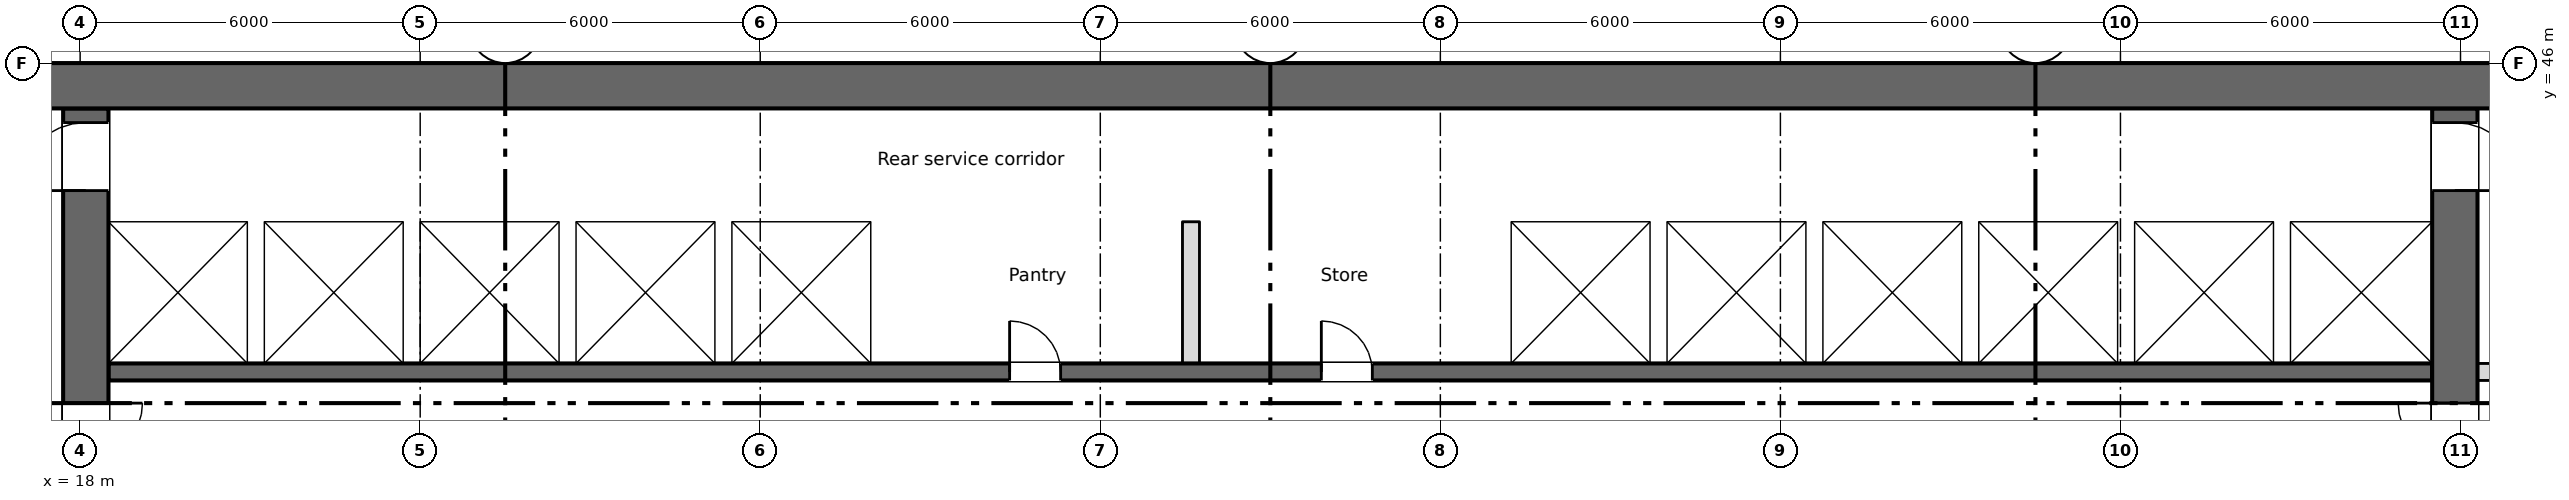
"""IFC4 building model, lengths in metres.
Left out: names, types, materials, properties, quantities, classifications, styles, units other than length and angle.
Written with IfcOpenShell. Run it as: python <this file> out.ifc"""

import sys

from ifc_helpers import new_model, si_unit, direction, frame, frame_2d, origin, place, context, subcontext, project, spatial, rectangle, extrude, element, fill, save


model = new_model("IFC4")
c1 = context("Model", 3, precision=1e-05, world=origin(), true_north=direction((0.0, 1.0)))
c2 = subcontext(c1, "Body", "Model", "MODEL_VIEW")
j1 = project(units=[si_unit("LENGTHUNIT", "METRE"), si_unit("PLANEANGLEUNIT", "RADIAN")], contexts=[c1])
p1 = place(None, origin())
s1 = spatial("IfcSite", under=j1, at=p1, CompositionType="ELEMENT")
p2 = place(p1, origin())
s2 = spatial("IfcBuilding", under=s1, at=p2, CompositionType="ELEMENT")
p3 = place(p2, frame((0.0, 0.0, 113.75)))
s3 = spatial("IfcBuildingStorey", under=s2, at=p3, CompositionType="ELEMENT", Elevation=113.75)
p4 = place(p3, frame((5.55, 45.6, 0.0), z_axis=(0.0, 0.0, 1.0), x_axis=(1.0, 0.0, 0.0)))
e1 = element("IfcWall", 1, at=p4, inside=s3, PredefinedType="SHEAR", context=c2, shape_type="SweptSolid", body=[
    extrude(rectangle(XDim=60.9, YDim=0.8, at=frame_2d((30.45, 0.0))), origin(), (0.0, 0.0, 1.0), 3.35),
])
p5 = place(p4, frame((1.2, 0.0, 0.6)))
e2 = element("IfcOpeningElement", 2, at=p5, cuts=e1, PredefinedType="OPENING", context=c2, shape_type="SweptSolid", body=[
    extrude(rectangle(XDim=0.6, YDim=2.4, at=frame_2d((0.3, 1.2))), frame((0.0, 0.41, 0.0), z_axis=(0.0, -1.0, 0.0), x_axis=(1.0, 0.0, 0.0)), (0.0, 0.0, 1.0), 0.82),
])
p6 = place(p4, frame((7.2, 0.0, 0.6)))
e3 = element("IfcOpeningElement", 3, at=p6, cuts=e1, PredefinedType="OPENING", context=c2, shape_type="SweptSolid", body=[
    extrude(rectangle(XDim=0.6, YDim=2.4, at=frame_2d((0.3, 1.2))), frame((0.0, 0.41, 0.0), z_axis=(0.0, -1.0, 0.0), x_axis=(1.0, 0.0, 0.0)), (0.0, 0.0, 1.0), 0.82),
])
p7 = place(p3, frame((18.1, 28.4, 0.0), z_axis=(0.0, 0.0, 1.0), x_axis=(0.0, 1.0, 0.0)))
e4 = element("IfcWall", 4, at=p7, inside=s3, PredefinedType="SHEAR", context=c2, shape_type="SweptSolid", body=[
    extrude(rectangle(XDim=16.8, YDim=0.8, at=frame_2d((8.4, 0.0))), origin(), (0.0, 0.0, 1.0), 3.35),
])
p8 = place(p7, frame((9.6, 0.0, 0.0)))
e5 = element("IfcOpeningElement", 5, at=p8, cuts=e4, PredefinedType="OPENING", context=c2, shape_type="SweptSolid", body=[
    extrude(rectangle(XDim=2.0, YDim=2.1, at=frame_2d((1.0, 1.05))), frame((0.0, 0.41, 0.0), z_axis=(0.0, -1.0, 0.0), x_axis=(1.0, 0.0, 0.0)), (0.0, 0.0, 1.0), 0.82),
])
p9 = place(p7, frame((15.35, 0.0, 0.0)))
e6 = element("IfcOpeningElement", 6, at=p9, cuts=e4, PredefinedType="OPENING", context=c2, shape_type="SweptSolid", body=[
    extrude(rectangle(XDim=1.2, YDim=2.1, at=frame_2d((0.6, 1.05))), frame((0.0, 0.41, 0.0), z_axis=(0.0, -1.0, 0.0), x_axis=(1.0, 0.0, 0.0)), (0.0, 0.0, 1.0), 0.82),
])
p10 = place(p3, frame((59.9, 28.4, 0.0), z_axis=(0.0, 0.0, 1.0), x_axis=(0.0, 1.0, 0.0)))
e7 = element("IfcWall", 7, at=p10, inside=s3, PredefinedType="SHEAR", context=c2, shape_type="SweptSolid", body=[
    extrude(rectangle(XDim=16.8, YDim=0.8, at=frame_2d((8.4, 0.0))), origin(), (0.0, 0.0, 1.0), 3.35),
])
p11 = place(p10, frame((9.6, 0.0, 0.0)))
e8 = element("IfcOpeningElement", 8, at=p11, cuts=e7, PredefinedType="OPENING", context=c2, shape_type="SweptSolid", body=[
    extrude(rectangle(XDim=2.0, YDim=2.1, at=frame_2d((1.0, 1.05))), frame((0.0, 0.41, 0.0), z_axis=(0.0, -1.0, 0.0), x_axis=(1.0, 0.0, 0.0)), (0.0, 0.0, 1.0), 0.82),
])
p12 = place(p10, frame((15.35, 0.0, 0.0)))
e9 = element("IfcOpeningElement", 9, at=p12, cuts=e7, PredefinedType="OPENING", context=c2, shape_type="SweptSolid", body=[
    extrude(rectangle(XDim=1.2, YDim=2.1, at=frame_2d((0.6, 1.05))), frame((0.0, 0.41, 0.0), z_axis=(0.0, -1.0, 0.0), x_axis=(1.0, 0.0, 0.0)), (0.0, 0.0, 1.0), 0.82),
])
p13 = place(p3, frame((18.5, 40.55, 0.0), z_axis=(0.0, 0.0, 1.0), x_axis=(1.0, 0.0, 0.0)))
e10 = element("IfcWall", 10, at=p13, inside=s3, PredefinedType="SHEAR", context=c2, shape_type="SweptSolid", body=[
    extrude(rectangle(XDim=41.0, YDim=0.3, at=frame_2d((20.5, 0.0))), origin(), (0.0, 0.0, 1.0), 3.35),
])
p14 = place(p13, frame((15.9, 0.0, 0.0)))
e11 = element("IfcOpeningElement", 11, at=p14, cuts=e10, PredefinedType="OPENING", context=c2, shape_type="SweptSolid", body=[
    extrude(rectangle(XDim=0.9, YDim=2.1, at=frame_2d((0.45, 1.05))), frame((0.0, 0.16, 0.0), z_axis=(0.0, -1.0, 0.0), x_axis=(1.0, 0.0, 0.0)), (0.0, 0.0, 1.0), 0.32),
])
p15 = place(p13, frame((21.4, 0.0, 0.0)))
e12 = element("IfcOpeningElement", 12, at=p15, cuts=e10, PredefinedType="OPENING", context=c2, shape_type="SweptSolid", body=[
    extrude(rectangle(XDim=0.9, YDim=2.1, at=frame_2d((0.45, 1.05))), frame((0.0, 0.16, 0.0), z_axis=(0.0, -1.0, 0.0), x_axis=(1.0, 0.0, 0.0)), (0.0, 0.0, 1.0), 0.32),
])
p16 = place(p13, frame((6.175, 0.0, 0.0)))
e13 = element("IfcOpeningElement", 13, at=p16, cuts=e10, PredefinedType="OPENING", context=c2, shape_type="SweptSolid", body=[
    extrude(rectangle(XDim=1.1, YDim=2.1, at=frame_2d((0.55, 1.05))), frame((0.0, 0.16, 0.0), z_axis=(0.0, -1.0, 0.0), x_axis=(1.0, 0.0, 0.0)), (0.0, 0.0, 1.0), 0.32),
])
p17 = place(p13, frame((8.925, 0.0, 0.0)))
e14 = element("IfcOpeningElement", 14, at=p17, cuts=e10, PredefinedType="OPENING", context=c2, shape_type="SweptSolid", body=[
    extrude(rectangle(XDim=1.1, YDim=2.1, at=frame_2d((0.55, 1.05))), frame((0.0, 0.16, 0.0), z_axis=(0.0, -1.0, 0.0), x_axis=(1.0, 0.0, 0.0)), (0.0, 0.0, 1.0), 0.32),
])
p18 = place(p13, frame((11.675, 0.0, 0.0)))
e15 = element("IfcOpeningElement", 15, at=p18, cuts=e10, PredefinedType="OPENING", context=c2, shape_type="SweptSolid", body=[
    extrude(rectangle(XDim=1.1, YDim=2.1, at=frame_2d((0.55, 1.05))), frame((0.0, 0.16, 0.0), z_axis=(0.0, -1.0, 0.0), x_axis=(1.0, 0.0, 0.0)), (0.0, 0.0, 1.0), 0.32),
])
p19 = place(p13, frame((30.925, 0.0, 0.0)))
e16 = element("IfcOpeningElement", 16, at=p19, cuts=e10, PredefinedType="OPENING", context=c2, shape_type="SweptSolid", body=[
    extrude(rectangle(XDim=1.1, YDim=2.1, at=frame_2d((0.55, 1.05))), frame((0.0, 0.16, 0.0), z_axis=(0.0, -1.0, 0.0), x_axis=(1.0, 0.0, 0.0)), (0.0, 0.0, 1.0), 0.32),
])
p20 = place(p13, frame((33.675, 0.0, 0.0)))
e17 = element("IfcOpeningElement", 17, at=p20, cuts=e10, PredefinedType="OPENING", context=c2, shape_type="SweptSolid", body=[
    extrude(rectangle(XDim=1.1, YDim=2.1, at=frame_2d((0.55, 1.05))), frame((0.0, 0.16, 0.0), z_axis=(0.0, -1.0, 0.0), x_axis=(1.0, 0.0, 0.0)), (0.0, 0.0, 1.0), 0.32),
])
p21 = place(p13, frame((36.375, 0.0, 0.0)))
e18 = element("IfcOpeningElement", 18, at=p21, cuts=e10, PredefinedType="OPENING", context=c2, shape_type="SweptSolid", body=[
    extrude(rectangle(XDim=1.2, YDim=2.1, at=frame_2d((0.6, 1.05))), frame((0.0, 0.16, 0.0), z_axis=(0.0, -1.0, 0.0), x_axis=(1.0, 0.0, 0.0)), (0.0, 0.0, 1.0), 0.32),
])
p22 = place(p13, frame((39.15, 0.0, 0.0)))
e19 = element("IfcOpeningElement", 19, at=p22, cuts=e10, PredefinedType="OPENING", context=c2, shape_type="SweptSolid", body=[
    extrude(rectangle(XDim=1.2, YDim=2.1, at=frame_2d((0.6, 1.05))), frame((0.0, 0.16, 0.0), z_axis=(0.0, -1.0, 0.0), x_axis=(1.0, 0.0, 0.0)), (0.0, 0.0, 1.0), 0.32),
])
p23 = place(p3, frame((18.5, 43.35, 0.0), z_axis=(0.0, 0.0, 1.0), x_axis=(1.0, 0.0, 0.0)))
e20 = element("IfcWall", 20, at=p23, inside=s3, PredefinedType="SHEAR", context=c2, shape_type="SweptSolid", body=[
    extrude(rectangle(XDim=41.0, YDim=0.3, at=frame_2d((20.5, 0.0))), origin(), (0.0, 0.0, 1.0), 3.35),
])
p24 = place(p3, frame((60.3, 40.55, 0.0), z_axis=(0.0, 0.0, 1.0), x_axis=(1.0, 0.0, 0.0)))
e21 = element("IfcWall", 21, at=p24, inside=s3, PredefinedType="PARTITIONING", context=c2, shape_type="SweptSolid", body=[
    extrude(rectangle(XDim=2.4, YDim=0.3, at=frame_2d((1.2, 0.0))), origin(), (0.0, 0.0, 1.0), 3.35),
])
p25 = place(p24, frame((0.675, 0.0, 0.0)))
e22 = element("IfcOpeningElement", 22, at=p25, cuts=e21, PredefinedType="OPENING", context=c2, shape_type="SweptSolid", body=[
    extrude(rectangle(XDim=0.9, YDim=2.1, at=frame_2d((0.45, 1.05))), frame((0.0, 0.16, 0.0), z_axis=(0.0, -1.0, 0.0), x_axis=(1.0, 0.0, 0.0)), (0.0, 0.0, 1.0), 0.32),
])
for number, where, z_axis, x_axis in (
    (23, (21.1, 40.7, 0.0), (0.0, 0.0, 1.0), (0.0, 1.0, 0.0)),
    (24, (23.85, 40.7, 0.0), (0.0, 0.0, 1.0), (0.0, 1.0, 0.0)),
    (25, (26.6, 40.7, 0.0), (0.0, 0.0, 1.0), (0.0, 1.0, 0.0)),
    (26, (29.35, 40.7, 0.0), (0.0, 0.0, 1.0), (0.0, 1.0, 0.0)),
    (27, (32.1, 40.7, 0.0), (0.0, 0.0, 1.0), (0.0, 1.0, 0.0)),
    (28, (43.1, 40.7, 0.0), (0.0, 0.0, 1.0), (0.0, 1.0, 0.0)),
    (29, (45.85, 40.7, 0.0), (0.0, 0.0, 1.0), (0.0, 1.0, 0.0)),
    (30, (48.6, 40.7, 0.0), (0.0, 0.0, 1.0), (0.0, 1.0, 0.0)),
    (31, (51.35, 40.7, 0.0), (0.0, 0.0, 1.0), (0.0, 1.0, 0.0)),
    (32, (54.1, 40.7, 0.0), (0.0, 0.0, 1.0), (0.0, 1.0, 0.0)),
    (33, (56.85, 40.7, 0.0), (0.0, 0.0, 1.0), (0.0, 1.0, 0.0)),
):
    element("IfcWall", number, at=place(p3, frame(where, z_axis=z_axis, x_axis=x_axis)), inside=s3, PredefinedType="SHEAR", context=c2, shape_type="SweptSolid", body=[
        extrude(rectangle(XDim=2.5, YDim=0.3, at=frame_2d((1.25, 0.0))), origin(), (0.0, 0.0, 1.0), 3.35),
    ])
p26 = place(p3, frame((37.6, 40.7, 0.0), z_axis=(0.0, 0.0, 1.0), x_axis=(0.0, 1.0, 0.0)))
e34 = element("IfcWall", 34, at=p26, inside=s3, PredefinedType="PARTITIONING", context=c2, shape_type="SweptSolid", body=[
    extrude(rectangle(XDim=2.5, YDim=0.3, at=frame_2d((1.25, 0.0))), origin(), (0.0, 0.0, 1.0), 3.35),
])
p27 = place(p14, origin())
e35 = element("IfcDoor", 35, at=p27, inside=s3, OperationType="SINGLE_SWING_LEFT", PredefinedType="DOOR", context=c2, shape_type="SweptSolid", body=[
    extrude(rectangle(XDim=0.9, YDim=2.1, at=frame_2d((0.45, 1.05))), frame((0.0, 0.025, 0.0), z_axis=(0.0, -1.0, 0.0), x_axis=(1.0, 0.0, 0.0)), (0.0, 0.0, 1.0), 0.05),
])
fill(e11, e35)
p28 = place(p15, origin())
e36 = element("IfcDoor", 36, at=p28, inside=s3, OperationType="SINGLE_SWING_LEFT", PredefinedType="DOOR", context=c2, shape_type="SweptSolid", body=[
    extrude(rectangle(XDim=0.9, YDim=2.1, at=frame_2d((0.45, 1.05))), frame((0.0, 0.025, 0.0), z_axis=(0.0, -1.0, 0.0), x_axis=(1.0, 0.0, 0.0)), (0.0, 0.0, 1.0), 0.05),
])
fill(e12, e36)
p29 = place(p16, origin())
e37 = element("IfcDoor", 37, at=p29, inside=s3, OperationType="SLIDING_TO_LEFT", PredefinedType="DOOR", context=c2, shape_type="SweptSolid", body=[
    extrude(rectangle(XDim=1.1, YDim=2.1, at=frame_2d((0.55, 1.05))), frame((0.0, 0.025, 0.0), z_axis=(0.0, -1.0, 0.0), x_axis=(1.0, 0.0, 0.0)), (0.0, 0.0, 1.0), 0.05),
])
fill(e13, e37)
p30 = place(p17, origin())
e38 = element("IfcDoor", 38, at=p30, inside=s3, OperationType="SLIDING_TO_LEFT", PredefinedType="DOOR", context=c2, shape_type="SweptSolid", body=[
    extrude(rectangle(XDim=1.1, YDim=2.1, at=frame_2d((0.55, 1.05))), frame((0.0, 0.025, 0.0), z_axis=(0.0, -1.0, 0.0), x_axis=(1.0, 0.0, 0.0)), (0.0, 0.0, 1.0), 0.05),
])
fill(e14, e38)
p31 = place(p18, origin())
e39 = element("IfcDoor", 39, at=p31, inside=s3, OperationType="SLIDING_TO_LEFT", PredefinedType="DOOR", context=c2, shape_type="SweptSolid", body=[
    extrude(rectangle(XDim=1.1, YDim=2.1, at=frame_2d((0.55, 1.05))), frame((0.0, 0.025, 0.0), z_axis=(0.0, -1.0, 0.0), x_axis=(1.0, 0.0, 0.0)), (0.0, 0.0, 1.0), 0.05),
])
fill(e15, e39)
p32 = place(p19, origin())
e40 = element("IfcDoor", 40, at=p32, inside=s3, OperationType="SLIDING_TO_LEFT", PredefinedType="DOOR", context=c2, shape_type="SweptSolid", body=[
    extrude(rectangle(XDim=1.1, YDim=2.1, at=frame_2d((0.55, 1.05))), frame((0.0, 0.025, 0.0), z_axis=(0.0, -1.0, 0.0), x_axis=(1.0, 0.0, 0.0)), (0.0, 0.0, 1.0), 0.05),
])
fill(e16, e40)
p33 = place(p20, origin())
e41 = element("IfcDoor", 41, at=p33, inside=s3, OperationType="SLIDING_TO_LEFT", PredefinedType="DOOR", context=c2, shape_type="SweptSolid", body=[
    extrude(rectangle(XDim=1.1, YDim=2.1, at=frame_2d((0.55, 1.05))), frame((0.0, 0.025, 0.0), z_axis=(0.0, -1.0, 0.0), x_axis=(1.0, 0.0, 0.0)), (0.0, 0.0, 1.0), 0.05),
])
fill(e17, e41)
p34 = place(p21, origin())
e42 = element("IfcDoor", 42, at=p34, inside=s3, OperationType="SLIDING_TO_LEFT", PredefinedType="DOOR", context=c2, shape_type="SweptSolid", body=[
    extrude(rectangle(XDim=1.2, YDim=2.1, at=frame_2d((0.6, 1.05))), frame((0.0, 0.025, 0.0), z_axis=(0.0, -1.0, 0.0), x_axis=(1.0, 0.0, 0.0)), (0.0, 0.0, 1.0), 0.05),
])
fill(e18, e42)
p35 = place(p22, origin())
e43 = element("IfcDoor", 43, at=p35, inside=s3, OperationType="SLIDING_TO_LEFT", PredefinedType="DOOR", context=c2, shape_type="SweptSolid", body=[
    extrude(rectangle(XDim=1.2, YDim=2.1, at=frame_2d((0.6, 1.05))), frame((0.0, 0.025, 0.0), z_axis=(0.0, -1.0, 0.0), x_axis=(1.0, 0.0, 0.0)), (0.0, 0.0, 1.0), 0.05),
])
fill(e19, e43)
p36 = place(p8, origin())
e44 = element("IfcDoor", 44, at=p36, inside=s3, OperationType="DOUBLE_DOOR_SINGLE_SWING", PredefinedType="DOOR", context=c2, shape_type="SweptSolid", body=[
    extrude(rectangle(XDim=2.0, YDim=2.1, at=frame_2d((1.0, 1.05))), frame((0.0, 0.025, 0.0), z_axis=(0.0, -1.0, 0.0), x_axis=(1.0, 0.0, 0.0)), (0.0, 0.0, 1.0), 0.05),
])
fill(e5, e44)
p37 = place(p11, origin())
e45 = element("IfcDoor", 45, at=p37, inside=s3, OperationType="DOUBLE_DOOR_SINGLE_SWING", PredefinedType="DOOR", context=c2, shape_type="SweptSolid", body=[
    extrude(rectangle(XDim=2.0, YDim=2.1, at=frame_2d((1.0, 1.05))), frame((0.0, 0.025, 0.0), z_axis=(0.0, -1.0, 0.0), x_axis=(1.0, 0.0, 0.0)), (0.0, 0.0, 1.0), 0.05),
])
fill(e8, e45)
p38 = place(p9, origin())
e46 = element("IfcDoor", 46, at=p38, inside=s3, OperationType="SINGLE_SWING_LEFT", PredefinedType="DOOR", context=c2, shape_type="SweptSolid", body=[
    extrude(rectangle(XDim=1.2, YDim=2.1, at=frame_2d((0.6, 1.05))), frame((0.0, 0.025, 0.0), z_axis=(0.0, -1.0, 0.0), x_axis=(1.0, 0.0, 0.0)), (0.0, 0.0, 1.0), 0.05),
])
fill(e6, e46)
p39 = place(p12, origin())
e47 = element("IfcDoor", 47, at=p39, inside=s3, OperationType="SINGLE_SWING_LEFT", PredefinedType="DOOR", context=c2, shape_type="SweptSolid", body=[
    extrude(rectangle(XDim=1.2, YDim=2.1, at=frame_2d((0.6, 1.05))), frame((0.0, 0.025, 0.0), z_axis=(0.0, -1.0, 0.0), x_axis=(1.0, 0.0, 0.0)), (0.0, 0.0, 1.0), 0.05),
])
fill(e9, e47)
save(model, sys.argv[1])
